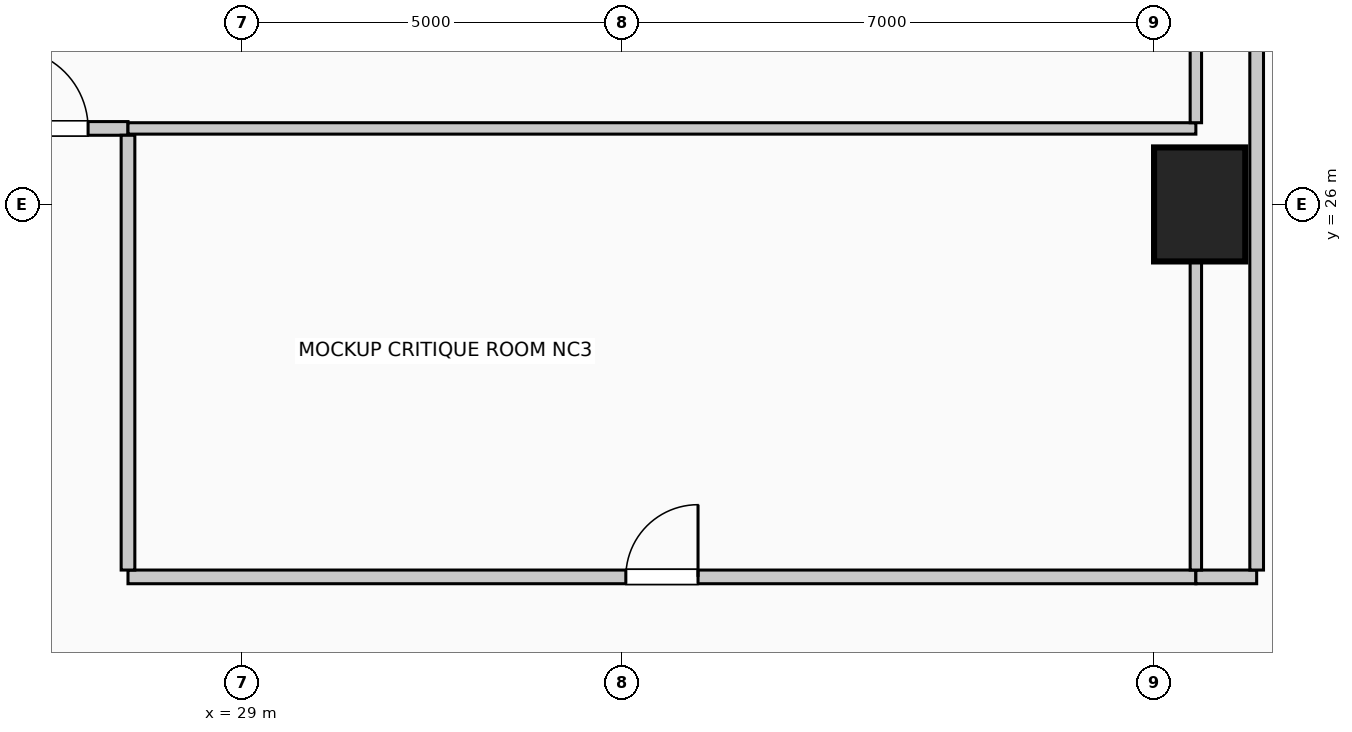
"""IFC4 building model, lengths in metres.
Left out: names, types, materials, properties, quantities, classifications, styles, units other than length and angle.
Written with IfcOpenShell. Run it as: python <this file> out.ifc"""

import sys

from ifc_helpers import new_model, si_unit, direction, frame, frame_2d, origin, origin_2d, place, context, subcontext, project, spatial, rectangle, extrude, element, fill, save


model = new_model("IFC4")
c1 = context("Model", 3, precision=1e-05, world=origin(), true_north=direction((0.0, 1.0)))
c2 = subcontext(c1, "Body", "Model", "MODEL_VIEW")
j1 = project(units=[si_unit("LENGTHUNIT", "METRE"), si_unit("PLANEANGLEUNIT", "RADIAN")], contexts=[c1])
p1 = place(None, origin())
s1 = spatial("IfcSite", under=j1, at=p1, CompositionType="ELEMENT")
p2 = place(p1, origin())
s2 = spatial("IfcBuilding", under=s1, at=p2, CompositionType="ELEMENT")
p3 = place(p2, frame((0.0, 0.0, 62.6)))
s3 = spatial("IfcBuildingStorey", under=s2, at=p3, CompositionType="ELEMENT", Elevation=62.6)
p4 = place(p3, frame((41.6, 26.0, 0.0), z_axis=(0.0, 0.0, 1.0), x_axis=(1.0, 0.0, 0.0)))
e1 = element("IfcColumn", 1, at=p4, inside=s3, PredefinedType="COLUMN", context=c2, shape_type="SweptSolid", body=[
    extrude(rectangle(XDim=1.2, YDim=1.5, at=origin_2d()), origin(), (0.0, 0.0, 1.0), 4.0),
])
p5 = place(p3, frame((27.5, 21.1, 0.0), z_axis=(0.0, 0.0, 1.0), x_axis=(1.0, 0.0, 0.0)))
e2 = element("IfcWall", 2, at=p5, inside=s3, PredefinedType="PARTITIONING", context=c2, shape_type="SweptSolid", body=[
    extrude(rectangle(XDim=14.05, YDim=0.18, at=frame_2d((7.025, 0.0))), origin(), (0.0, 0.0, 1.0), 3.7),
])
p6 = place(p5, frame((6.55, 0.0, 0.0)))
e3 = element("IfcOpeningElement", 3, at=p6, cuts=e2, PredefinedType="OPENING", context=c2, shape_type="SweptSolid", body=[
    extrude(rectangle(XDim=0.95, YDim=2.15, at=frame_2d((0.475, 1.075))), frame((0.0, 0.1, 0.0), z_axis=(0.0, -1.0, 0.0), x_axis=(1.0, 0.0, 0.0)), (0.0, 0.0, 1.0), 0.2),
])
p7 = place(p3, frame((41.55, 21.1, 0.0), z_axis=(0.0, 0.0, 1.0), x_axis=(1.0, 0.0, 0.0)))
e4 = element("IfcWall", 4, at=p7, inside=s3, PredefinedType="PARTITIONING", context=c2, shape_type="SweptSolid", body=[
    extrude(rectangle(XDim=0.8, YDim=0.18, at=frame_2d((0.4, 0.0))), origin(), (0.0, 0.0, 1.0), 3.7),
])
p8 = place(p3, frame((25.4, 27.0, 0.0), z_axis=(0.0, 0.0, 1.0), x_axis=(1.0, 0.0, 0.0)))
e5 = element("IfcWall", 5, at=p8, inside=s3, PredefinedType="PARTITIONING", context=c2, shape_type="SweptSolid", body=[
    extrude(rectangle(XDim=2.1, YDim=0.18, at=frame_2d((1.05, 0.0))), origin(), (0.0, 0.0, 1.0), 3.7),
])
p9 = place(p8, frame((0.525, 0.0, 0.0)))
e6 = element("IfcOpeningElement", 6, at=p9, cuts=e5, PredefinedType="OPENING", context=c2, shape_type="SweptSolid", body=[
    extrude(rectangle(XDim=1.05, YDim=2.15, at=frame_2d((0.525, 1.075))), frame((0.0, 0.1, 0.0), z_axis=(0.0, -1.0, 0.0), x_axis=(1.0, 0.0, 0.0)), (0.0, 0.0, 1.0), 0.2),
])
p10 = place(p3, frame((27.5, 27.0, 0.0), z_axis=(0.0, 0.0, 1.0), x_axis=(1.0, 0.0, 0.0)))
e7 = element("IfcWall", 7, at=p10, inside=s3, PredefinedType="PARTITIONING", context=c2, shape_type="SweptSolid", body=[
    extrude(rectangle(XDim=14.05, YDim=0.15, at=frame_2d((7.025, 0.0))), origin(), (0.0, 0.0, 1.0), 3.7),
])
p11 = place(p3, frame((27.5, 21.19, 0.0), z_axis=(0.0, 0.0, 1.0), x_axis=(0.0, 1.0, 0.0)))
e8 = element("IfcWall", 8, at=p11, inside=s3, PredefinedType="PARTITIONING", context=c2, shape_type="SweptSolid", body=[
    extrude(rectangle(XDim=5.72, YDim=0.18, at=frame_2d((2.86, 0.0))), origin(), (0.0, 0.0, 1.0), 3.7),
])
p12 = place(p3, frame((41.55, 21.19, 0.0), z_axis=(0.0, 0.0, 1.0), x_axis=(0.0, 1.0, 0.0)))
e9 = element("IfcWall", 9, at=p12, inside=s3, PredefinedType="PARTITIONING", context=c2, shape_type="SweptSolid", body=[
    extrude(rectangle(XDim=4.06, YDim=0.15, at=frame_2d((2.03, 0.0))), origin(), (0.0, 0.0, 1.0), 2.995),
])
p13 = place(p3, frame((41.55, 27.075, 0.0), z_axis=(0.0, 0.0, 1.0), x_axis=(0.0, 1.0, 0.0)))
e10 = element("IfcWall", 10, at=p13, inside=s3, PredefinedType="PARTITIONING", context=c2, shape_type="SweptSolid", body=[
    extrude(rectangle(XDim=5.2, YDim=0.15, at=frame_2d((2.6, 0.0))), origin(), (0.0, 0.0, 1.0), 2.995),
])
p14 = place(p3, frame((42.35, 21.19, 0.0), z_axis=(0.0, 0.0, 1.0), x_axis=(0.0, 1.0, 0.0)))
e11 = element("IfcWall", 11, at=p14, inside=s3, PredefinedType="PARTITIONING", context=c2, shape_type="SweptSolid", body=[
    extrude(rectangle(XDim=11.085, YDim=0.18, at=frame_2d((5.542, 0.0))), origin(), (0.0, 0.0, 1.0), 3.7),
])
p15 = place(p6, origin())
e12 = element("IfcDoor", 12, at=p15, inside=s3, OperationType="SINGLE_SWING_RIGHT", PredefinedType="DOOR", context=c2, shape_type="SweptSolid", body=[
    extrude(rectangle(XDim=0.95, YDim=2.15, at=frame_2d((0.475, 1.075))), frame((0.0, 0.025, 0.0), z_axis=(0.0, -1.0, 0.0), x_axis=(1.0, 0.0, 0.0)), (0.0, 0.0, 1.0), 0.05),
])
fill(e3, e12)
p16 = place(p9, origin())
e13 = element("IfcDoor", 13, at=p16, inside=s3, OperationType="SINGLE_SWING_LEFT", PredefinedType="DOOR", context=c2, shape_type="SweptSolid", body=[
    extrude(rectangle(XDim=1.05, YDim=2.15, at=frame_2d((0.525, 1.075))), frame((0.0, 0.025, 0.0), z_axis=(0.0, -1.0, 0.0), x_axis=(1.0, 0.0, 0.0)), (0.0, 0.0, 1.0), 0.05),
])
fill(e6, e13)
save(model, sys.argv[1])
